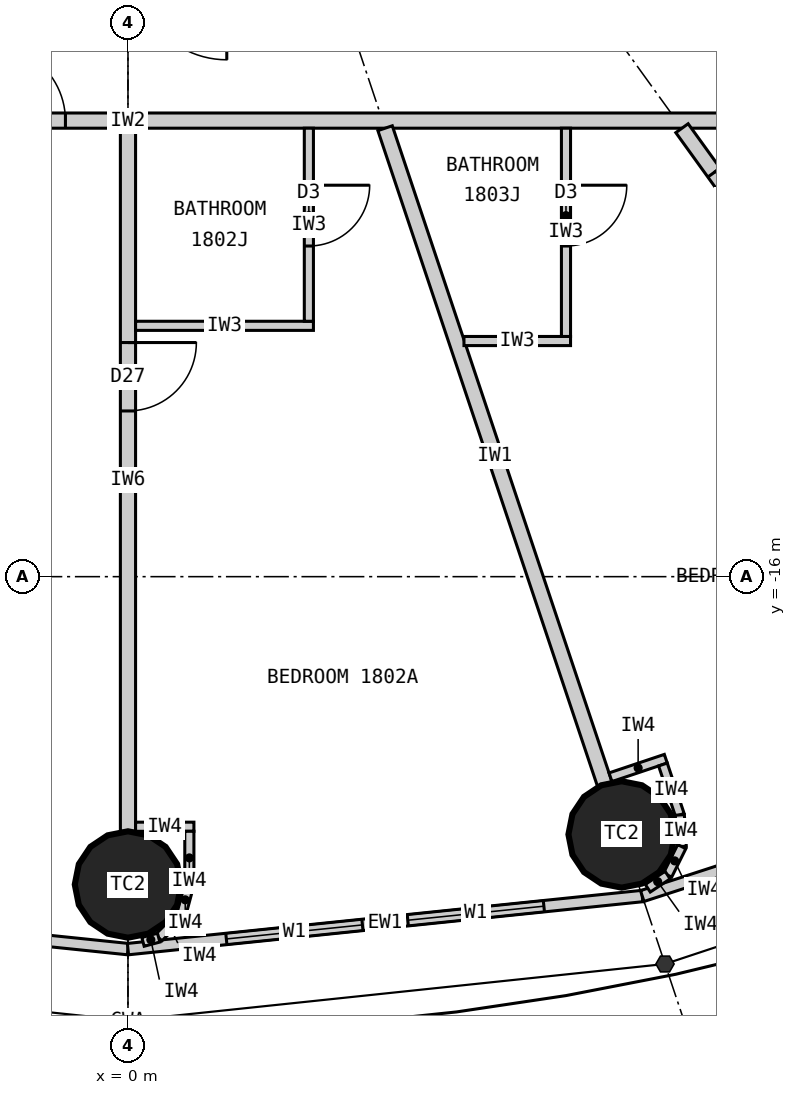
"""IFC4 building model, lengths in metres.
Left out: names, types, materials, properties, quantities, classifications, styles, units other than length and angle.
Written with IfcOpenShell. Run it as: python <this file> out.ifc"""

import sys

from ifc_helpers import new_model, si_unit, direction, frame, frame_2d, origin, origin_2d, place, context, subcontext, project, spatial, rectangle, circle, extrude, element, fill, save


model = new_model("IFC4")
c1 = context("Model", 3, precision=1e-05, world=origin(), true_north=direction((0.0, 1.0)))
c2 = subcontext(c1, "Body", "Model", "MODEL_VIEW")
j1 = project(units=[si_unit("LENGTHUNIT", "METRE"), si_unit("PLANEANGLEUNIT", "RADIAN")], contexts=[c1])
p1 = place(None, origin())
s1 = spatial("IfcSite", under=j1, at=p1, CompositionType="ELEMENT")
p2 = place(p1, origin())
s2 = spatial("IfcBuilding", under=s1, at=p2, CompositionType="ELEMENT")
p3 = place(p2, frame((0.0, 0.0, 73.8)))
s3 = spatial("IfcBuildingStorey", under=s2, at=p3, CompositionType="ELEMENT", Elevation=73.8)
for number, where, z_axis, x_axis in (
    (1, (0.0, -20.05, 0.0), (0.0, 0.0, 1.0), (1.0, 0.0, 0.0)),
    (2, (6.495, -19.391, 0.0), (0.0, 0.0, 1.0), (1.0, 0.0, 0.0)),
):
    element("IfcColumn", number, at=place(p3, frame(where, z_axis=z_axis, x_axis=x_axis)), inside=s3, PredefinedType="COLUMN", context=c2, shape_type="SweptSolid", body=[
        extrude(circle(Radius=0.7, at=origin_2d()), origin(), (0.0, 0.0, 1.0), 3.3),
    ])
p4 = place(p3, frame((-6.766, -20.202, 0.0), z_axis=(0.0, 0.0, 1.0), x_axis=(0.994721394369, -0.102612609291, 0.0)))
e3 = element("IfcWall", 3, at=p4, inside=s3, PredefinedType="ELEMENTEDWALL", context=c2, shape_type="SweptSolid", body=[
    extrude(rectangle(XDim=6.802, YDim=0.15, at=frame_2d((3.401, 0.0))), origin(), (0.0, 0.0, 1.0), 3.12),
])
p5 = place(p4, frame((1.301, 0.0, 0.9)))
e4 = element("IfcOpeningElement", 4, at=p5, cuts=e3, PredefinedType="OPENING", context=c2, shape_type="SweptSolid", body=[
    extrude(rectangle(XDim=1.8, YDim=1.9, at=frame_2d((0.9, 0.95))), frame((0.0, 0.085, 0.0), z_axis=(0.0, -1.0, 0.0), x_axis=(1.0, 0.0, 0.0)), (0.0, 0.0, 1.0), 0.17),
])
p6 = place(p4, frame((3.701, 0.0, 0.9)))
e5 = element("IfcOpeningElement", 5, at=p6, cuts=e3, PredefinedType="OPENING", context=c2, shape_type="SweptSolid", body=[
    extrude(rectangle(XDim=1.8, YDim=1.9, at=frame_2d((0.9, 0.95))), frame((0.0, 0.085, 0.0), z_axis=(0.0, -1.0, 0.0), x_axis=(1.0, 0.0, 0.0)), (0.0, 0.0, 1.0), 0.17),
])
p7 = place(p3, frame((0.0, -20.9, 0.0), z_axis=(0.0, 0.0, 1.0), x_axis=(0.994721394369, 0.102612609291, 0.0)))
e6 = element("IfcWall", 6, at=p7, inside=s3, PredefinedType="ELEMENTEDWALL", context=c2, shape_type="SweptSolid", body=[
    extrude(rectangle(XDim=6.802, YDim=0.15, at=frame_2d((3.401, 0.0))), origin(), (0.0, 0.0, 1.0), 3.12),
])
p8 = place(p7, frame((1.301, 0.0, 0.9)))
e7 = element("IfcOpeningElement", 7, at=p8, cuts=e6, PredefinedType="OPENING", context=c2, shape_type="SweptSolid", body=[
    extrude(rectangle(XDim=1.8, YDim=1.9, at=frame_2d((0.9, 0.95))), frame((0.0, 0.085, 0.0), z_axis=(0.0, -1.0, 0.0), x_axis=(1.0, 0.0, 0.0)), (0.0, 0.0, 1.0), 0.17),
])
p9 = place(p7, frame((3.701, 0.0, 0.9)))
e8 = element("IfcOpeningElement", 8, at=p9, cuts=e6, PredefinedType="OPENING", context=c2, shape_type="SweptSolid", body=[
    extrude(rectangle(XDim=1.8, YDim=1.9, at=frame_2d((0.9, 0.95))), frame((0.0, 0.085, 0.0), z_axis=(0.0, -1.0, 0.0), x_axis=(1.0, 0.0, 0.0)), (0.0, 0.0, 1.0), 0.17),
])
p10 = place(p3, frame((6.766, -20.202, 0.0), z_axis=(0.0, 0.0, 1.0), x_axis=(0.951137534625, 0.308767534285, 0.0)))
e9 = element("IfcWall", 9, at=p10, inside=s3, PredefinedType="ELEMENTEDWALL", context=c2, shape_type="SweptSolid", body=[
    extrude(rectangle(XDim=6.655, YDim=0.15, at=frame_2d((3.328, 0.0))), origin(), (0.0, 0.0, 1.0), 3.12),
])
p11 = place(p10, frame((1.228, 0.0, 0.9)))
e10 = element("IfcOpeningElement", 10, at=p11, cuts=e9, PredefinedType="OPENING", context=c2, shape_type="SweptSolid", body=[
    extrude(rectangle(XDim=1.8, YDim=1.9, at=frame_2d((0.9, 0.95))), frame((0.0, 0.085, 0.0), z_axis=(0.0, -1.0, 0.0), x_axis=(1.0, 0.0, 0.0)), (0.0, 0.0, 1.0), 0.17),
])
p12 = place(p10, frame((3.628, 0.0, 0.9)))
e11 = element("IfcOpeningElement", 11, at=p12, cuts=e9, PredefinedType="OPENING", context=c2, shape_type="SweptSolid", body=[
    extrude(rectangle(XDim=1.8, YDim=1.9, at=frame_2d((0.9, 0.95))), frame((0.0, 0.085, 0.0), z_axis=(0.0, -1.0, 0.0), x_axis=(1.0, 0.0, 0.0)), (0.0, 0.0, 1.0), 0.17),
])
p13 = place(p3, frame((14.1, -10.0, 0.0), z_axis=(0.0, 0.0, 1.0), x_axis=(-1.0, 0.0, 0.0)))
e12 = element("IfcWall", 12, at=p13, inside=s3, PredefinedType="PARTITIONING", context=c2, shape_type="SweptSolid", body=[
    extrude(rectangle(XDim=28.2, YDim=0.2, at=frame_2d((14.1, 0.0))), origin(), (0.0, 0.0, 1.0), 3.12),
])
p14 = place(p13, frame((24.165, 0.0, 0.0)))
e13 = element("IfcOpeningElement", 13, at=p14, cuts=e12, PredefinedType="OPENING", context=c2, shape_type="SweptSolid", body=[
    extrude(rectangle(XDim=1.0, YDim=2.2, at=frame_2d((0.5, 1.1))), frame((0.0, 0.11, 0.0), z_axis=(0.0, -1.0, 0.0), x_axis=(1.0, 0.0, 0.0)), (0.0, 0.0, 1.0), 0.22),
])
p15 = place(p13, frame((14.923, 0.0, 0.0)))
e14 = element("IfcOpeningElement", 14, at=p15, cuts=e12, PredefinedType="OPENING", context=c2, shape_type="SweptSolid", body=[
    extrude(rectangle(XDim=1.0, YDim=2.2, at=frame_2d((0.5, 1.1))), frame((0.0, 0.11, 0.0), z_axis=(0.0, -1.0, 0.0), x_axis=(1.0, 0.0, 0.0)), (0.0, 0.0, 1.0), 0.22),
])
p16 = place(p13, frame((3.035, 0.0, 0.0)))
e15 = element("IfcOpeningElement", 15, at=p16, cuts=e12, PredefinedType="OPENING", context=c2, shape_type="SweptSolid", body=[
    extrude(rectangle(XDim=1.0, YDim=2.2, at=frame_2d((0.5, 1.1))), frame((0.0, 0.11, 0.0), z_axis=(0.0, -1.0, 0.0), x_axis=(1.0, 0.0, 0.0)), (0.0, 0.0, 1.0), 0.22),
])
p17 = place(p3, frame((0.0, -10.1, 0.0), z_axis=(0.0, 0.0, 1.0), x_axis=(0.0, -1.0, 0.0)))
e16 = element("IfcWall", 16, at=p17, inside=s3, PredefinedType="PARTITIONING", context=c2, shape_type="SweptSolid", body=[
    extrude(rectangle(XDim=9.25, YDim=0.2, at=frame_2d((4.625, 0.0))), origin(), (0.0, 0.0, 1.0), 2.32),
])
p18 = place(p17, frame((2.82, 0.0, 0.0)))
e17 = element("IfcOpeningElement", 17, at=p18, cuts=e16, PredefinedType="OPENING", context=c2, shape_type="SweptSolid", body=[
    extrude(rectangle(XDim=0.9, YDim=2.1, at=frame_2d((0.45, 1.05))), frame((0.0, 0.11, 0.0), z_axis=(0.0, -1.0, 0.0), x_axis=(1.0, 0.0, 0.0)), (0.0, 0.0, 1.0), 0.22),
])
p19 = place(p3, frame((3.383, -10.1, 0.0), z_axis=(0.0, 0.0, 1.0), x_axis=(0.31759592231, -0.948226149256, 0.0)))
e18 = element("IfcWall", 18, at=p19, inside=s3, PredefinedType="PARTITIONING", context=c2, shape_type="SweptSolid", body=[
    extrude(rectangle(XDim=9.098, YDim=0.2, at=frame_2d((4.549, 0.0))), origin(), (0.0, 0.0, 1.0), 2.32),
])
p20 = place(p3, frame((7.289, -10.1, 0.0), z_axis=(0.0, 0.0, 1.0), x_axis=(0.585198353053, -0.810890182197, 0.0)))
e19 = element("IfcWall", 19, at=p20, inside=s3, PredefinedType="PARTITIONING", context=c2, shape_type="SweptSolid", body=[
    extrude(rectangle(XDim=8.36, YDim=0.2, at=frame_2d((4.18, 0.0))), origin(), (0.0, 0.0, 1.0), 2.32),
])
p21 = place(p20, frame((0.72, 0.0, 0.0)))
e20 = element("IfcOpeningElement", 20, at=p21, cuts=e19, PredefinedType="OPENING", context=c2, shape_type="SweptSolid", body=[
    extrude(rectangle(XDim=0.9, YDim=2.1, at=frame_2d((0.45, 1.05))), frame((0.0, 0.11, 0.0), z_axis=(0.0, -1.0, 0.0), x_axis=(1.0, 0.0, 0.0)), (0.0, 0.0, 1.0), 0.22),
])
p22 = place(p3, frame((0.1, -12.7, 0.0), z_axis=(0.0, 0.0, 1.0), x_axis=(1.0, 0.0, 0.0)))
e21 = element("IfcWall", 21, at=p22, inside=s3, PredefinedType="PARTITIONING", context=c2, shape_type="SweptSolid", body=[
    extrude(rectangle(XDim=2.34, YDim=0.12, at=frame_2d((1.17, 0.0))), origin(), (0.0, 0.0, 1.0), 3.12),
])
p23 = place(p3, frame((2.38, -10.1, 0.0), z_axis=(0.0, 0.0, 1.0), x_axis=(0.0, -1.0, 0.0)))
e22 = element("IfcWall", 22, at=p23, inside=s3, PredefinedType="PARTITIONING", context=c2, shape_type="SweptSolid", body=[
    extrude(rectangle(XDim=2.54, YDim=0.12, at=frame_2d((1.27, 0.0))), origin(), (0.0, 0.0, 1.0), 3.12),
])
p24 = place(p23, frame((0.75, 0.0, 0.0)))
e23 = element("IfcOpeningElement", 23, at=p24, cuts=e22, PredefinedType="OPENING", context=c2, shape_type="SweptSolid", body=[
    extrude(rectangle(XDim=0.8, YDim=2.1, at=frame_2d((0.4, 1.05))), frame((0.0, 0.07, 0.0), z_axis=(0.0, -1.0, 0.0), x_axis=(1.0, 0.0, 0.0)), (0.0, 0.0, 1.0), 0.14),
])
p25 = place(p3, frame((4.421, -12.9, 0.0), z_axis=(0.0, 0.0, 1.0), x_axis=(1.0, 0.0, 0.0)))
e24 = element("IfcWall", 24, at=p25, inside=s3, PredefinedType="PARTITIONING", context=c2, shape_type="SweptSolid", body=[
    extrude(rectangle(XDim=1.402, YDim=0.12, at=frame_2d((0.701, 0.0))), origin(), (0.0, 0.0, 1.0), 3.12),
])
p26 = place(p3, frame((5.763, -10.1, 0.0), z_axis=(0.0, 0.0, 1.0), x_axis=(0.0, -1.0, 0.0)))
e25 = element("IfcWall", 25, at=p26, inside=s3, PredefinedType="PARTITIONING", context=c2, shape_type="SweptSolid", body=[
    extrude(rectangle(XDim=2.74, YDim=0.12, at=frame_2d((1.37, 0.0))), origin(), (0.0, 0.0, 1.0), 3.12),
])
p27 = place(p26, frame((0.75, 0.0, 0.0)))
e26 = element("IfcOpeningElement", 26, at=p27, cuts=e25, PredefinedType="OPENING", context=c2, shape_type="SweptSolid", body=[
    extrude(rectangle(XDim=0.8, YDim=2.1, at=frame_2d((0.4, 1.05))), frame((0.0, 0.07, 0.0), z_axis=(0.0, -1.0, 0.0), x_axis=(1.0, 0.0, 0.0)), (0.0, 0.0, 1.0), 0.14),
])
p28 = place(p3, frame((0.1, -19.29, 0.0), z_axis=(0.0, 0.0, 1.0), x_axis=(1.0, 0.0, 0.0)))
e27 = element("IfcWall", 27, at=p28, inside=s3, PredefinedType="PARTITIONING", context=c2, shape_type="SweptSolid", body=[
    extrude(rectangle(XDim=0.767, YDim=0.12, at=frame_2d((0.384, 0.0))), origin(), (0.0, 0.0, 1.0), 3.12),
])
p29 = place(p3, frame((0.808, -19.35, 0.0), z_axis=(0.0, 0.0, 1.0), x_axis=(0.0, -1.0, 0.0)))
e28 = element("IfcWall", 28, at=p29, inside=s3, PredefinedType="PARTITIONING", context=c2, shape_type="SweptSolid", body=[
    extrude(rectangle(XDim=0.7, YDim=0.12, at=frame_2d((0.35, 0.0))), origin(), (0.0, 0.0, 1.0), 3.12),
])
p30 = place(p3, frame((0.808, -20.05, 0.0), z_axis=(0.0, 0.0, 1.0), x_axis=(-0.2592614205, -0.965807183573, 0.0)))
e29 = element("IfcWall", 29, at=p30, inside=s3, PredefinedType="PARTITIONING", context=c2, shape_type="SweptSolid", body=[
    extrude(rectangle(XDim=0.418, YDim=0.12, at=frame_2d((0.209, 0.0))), origin(), (0.0, 0.0, 1.0), 3.12),
])
p31 = place(p3, frame((0.699, -20.454, 0.0), z_axis=(0.0, 0.0, 1.0), x_axis=(-0.707106781187, -0.707106781187, 0.0)))
e30 = element("IfcWall", 30, at=p31, inside=s3, PredefinedType="PARTITIONING", context=c2, shape_type="SweptSolid", body=[
    extrude(rectangle(XDim=0.418, YDim=0.12, at=frame_2d((0.209, 0.0))), origin(), (0.0, 0.0, 1.0), 3.12),
])
p32 = place(p3, frame((0.404, -20.749, 0.0), z_axis=(0.0, 0.0, 1.0), x_axis=(-0.965759066438, -0.25944060128, 0.0)))
e31 = element("IfcWall", 31, at=p32, inside=s3, PredefinedType="PARTITIONING", context=c2, shape_type="SweptSolid", body=[
    extrude(rectangle(XDim=0.214, YDim=0.12, at=frame_2d((0.107, 0.0))), origin(), (0.0, 0.0, 1.0), 3.12),
])
p33 = place(p3, frame((6.348, -18.639, 0.0), z_axis=(0.0, 0.0, 1.0), x_axis=(0.948268951266, 0.317468102437, 0.0)))
e32 = element("IfcWall", 32, at=p33, inside=s3, PredefinedType="PARTITIONING", context=c2, shape_type="SweptSolid", body=[
    extrude(rectangle(XDim=0.768, YDim=0.12, at=frame_2d((0.384, 0.0))), origin(), (0.0, 0.0, 1.0), 3.12),
])
p34 = place(p3, frame((7.038, -18.471, 0.0), z_axis=(0.0, 0.0, 1.0), x_axis=(0.317378466199, -0.9482989556, 0.0)))
e33 = element("IfcWall", 33, at=p34, inside=s3, PredefinedType="PARTITIONING", context=c2, shape_type="SweptSolid", body=[
    extrude(rectangle(XDim=0.7, YDim=0.12, at=frame_2d((0.35, 0.0))), origin(), (0.0, 0.0, 1.0), 3.12),
])
p35 = place(p3, frame((7.26, -19.135, 0.0), z_axis=(0.0, 0.0, 1.0), x_axis=(0.0613238046, -0.99811792439, 0.0)))
e34 = element("IfcWall", 34, at=p35, inside=s3, PredefinedType="PARTITIONING", context=c2, shape_type="SweptSolid", body=[
    extrude(rectangle(XDim=0.418, YDim=0.12, at=frame_2d((0.209, 0.0))), origin(), (0.0, 0.0, 1.0), 3.12),
])
p36 = place(p3, frame((7.286, -19.552, 0.0), z_axis=(0.0, 0.0, 1.0), x_axis=(-0.445810757773, -0.89512723579, 0.0)))
e35 = element("IfcWall", 35, at=p36, inside=s3, PredefinedType="PARTITIONING", context=c2, shape_type="SweptSolid", body=[
    extrude(rectangle(XDim=0.418, YDim=0.12, at=frame_2d((0.209, 0.0))), origin(), (0.0, 0.0, 1.0), 3.12),
])
p37 = place(p3, frame((7.1, -19.926, 0.0), z_axis=(0.0, 0.0, 1.0), x_axis=(-0.833488262509, -0.552537162787, 0.0)))
e36 = element("IfcWall", 36, at=p37, inside=s3, PredefinedType="PARTITIONING", context=c2, shape_type="SweptSolid", body=[
    extrude(rectangle(XDim=0.313, YDim=0.12, at=frame_2d((0.156, 0.0))), origin(), (0.0, 0.0, 1.0), 3.12),
])
p38 = place(p8, origin())
e37 = element("IfcWindow", 37, at=p38, inside=s3, PartitioningType="SINGLE_PANEL", PredefinedType="WINDOW", context=c2, shape_type="SweptSolid", body=[
    extrude(rectangle(XDim=1.8, YDim=1.9, at=frame_2d((0.9, 0.95))), frame((0.0, 0.03, 0.0), z_axis=(0.0, -1.0, 0.0), x_axis=(1.0, 0.0, 0.0)), (0.0, 0.0, 1.0), 0.06),
])
fill(e7, e37)
p39 = place(p9, origin())
e38 = element("IfcWindow", 38, at=p39, inside=s3, PartitioningType="SINGLE_PANEL", PredefinedType="WINDOW", context=c2, shape_type="SweptSolid", body=[
    extrude(rectangle(XDim=1.8, YDim=1.9, at=frame_2d((0.9, 0.95))), frame((0.0, 0.03, 0.0), z_axis=(0.0, -1.0, 0.0), x_axis=(1.0, 0.0, 0.0)), (0.0, 0.0, 1.0), 0.06),
])
fill(e8, e38)
p40 = place(p15, origin())
e39 = element("IfcDoor", 39, at=p40, inside=s3, OperationType="SINGLE_SWING_RIGHT", PredefinedType="DOOR", context=c2, shape_type="SweptSolid", body=[
    extrude(rectangle(XDim=1.0, YDim=2.2, at=frame_2d((0.5, 1.1))), frame((0.0, 0.025, 0.0), z_axis=(0.0, -1.0, 0.0), x_axis=(1.0, 0.0, 0.0)), (0.0, 0.0, 1.0), 0.05),
])
fill(e14, e39)
p41 = place(p24, origin())
e40 = element("IfcDoor", 40, at=p41, inside=s3, OperationType="SINGLE_SWING_LEFT", PredefinedType="DOOR", context=c2, shape_type="SweptSolid", body=[
    extrude(rectangle(XDim=0.8, YDim=2.1, at=frame_2d((0.4, 1.05))), frame((0.0, 0.025, 0.0), z_axis=(0.0, -1.0, 0.0), x_axis=(1.0, 0.0, 0.0)), (0.0, 0.0, 1.0), 0.05),
])
fill(e23, e40)
p42 = place(p18, origin())
e41 = element("IfcDoor", 41, at=p42, inside=s3, OperationType="SINGLE_SWING_LEFT", PredefinedType="DOOR", context=c2, shape_type="SweptSolid", body=[
    extrude(rectangle(XDim=0.9, YDim=2.1, at=frame_2d((0.45, 1.05))), frame((0.0, 0.025, 0.0), z_axis=(0.0, -1.0, 0.0), x_axis=(1.0, 0.0, 0.0)), (0.0, 0.0, 1.0), 0.05),
])
fill(e17, e41)
p43 = place(p27, origin())
e42 = element("IfcDoor", 42, at=p43, inside=s3, OperationType="SINGLE_SWING_LEFT", PredefinedType="DOOR", context=c2, shape_type="SweptSolid", body=[
    extrude(rectangle(XDim=0.8, YDim=2.1, at=frame_2d((0.4, 1.05))), frame((0.0, 0.025, 0.0), z_axis=(0.0, -1.0, 0.0), x_axis=(1.0, 0.0, 0.0)), (0.0, 0.0, 1.0), 0.05),
])
fill(e26, e42)
p44 = place(p21, origin())
e43 = element("IfcDoor", 43, at=p44, inside=s3, OperationType="SINGLE_SWING_LEFT", PredefinedType="DOOR", context=c2, shape_type="SweptSolid", body=[
    extrude(rectangle(XDim=0.9, YDim=2.1, at=frame_2d((0.45, 1.05))), frame((0.0, 0.025, 0.0), z_axis=(0.0, -1.0, 0.0), x_axis=(1.0, 0.0, 0.0)), (0.0, 0.0, 1.0), 0.05),
])
fill(e20, e43)
save(model, sys.argv[1])
